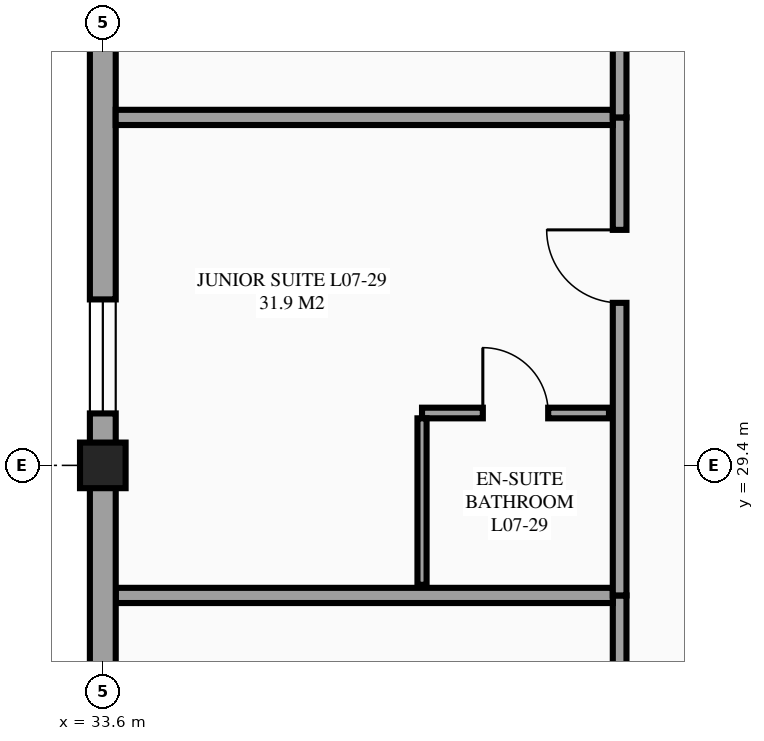
"""IFC4 building model, lengths in metres.
Left out: names, types, materials, properties, quantities, classifications, styles, units other than length and angle.
Written with IfcOpenShell. Run it as: python <this file> out.ifc"""

import sys

from ifc_helpers import new_model, si_unit, direction, frame, frame_2d, origin, origin_2d, place, context, subcontext, project, spatial, rectangle, extrude, element, fill, save


model = new_model("IFC4")
c1 = context("Model", 3, precision=1e-05, world=origin(), true_north=direction((0.0, 1.0)))
c2 = subcontext(c1, "Body", "Model", "MODEL_VIEW")
j1 = project(units=[si_unit("LENGTHUNIT", "METRE"), si_unit("PLANEANGLEUNIT", "RADIAN")], contexts=[c1])
p1 = place(None, origin())
s1 = spatial("IfcSite", under=j1, at=p1, CompositionType="ELEMENT")
p2 = place(p1, origin())
s2 = spatial("IfcBuilding", under=s1, at=p2, CompositionType="ELEMENT")
p3 = place(p2, frame((0.0, 0.0, 29.1)))
s3 = spatial("IfcBuildingStorey", under=s2, at=p3, CompositionType="ELEMENT", Elevation=29.1)
p4 = place(p3, frame((33.6, 29.4, 0.0), z_axis=(0.0, 0.0, 1.0), x_axis=(1.0, 0.0, 0.0)))
e1 = element("IfcColumn", 1, at=p4, inside=s3, PredefinedType="COLUMN", context=c2, shape_type="SweptSolid", body=[
    extrude(rectangle(XDim=0.6, YDim=0.6, at=origin_2d()), origin(), (0.0, 0.0, 1.0), 3.6),
])
p5 = place(p3, frame((33.6, 54.6, 0.0), z_axis=(0.0, 0.0, 1.0), x_axis=(0.0, -1.0, 0.0)))
e2 = element("IfcWall", 2, at=p5, inside=s3, PredefinedType="STANDARD", context=c2, shape_type="SweptSolid", body=[
    extrude(rectangle(XDim=25.2, YDim=0.34, at=frame_2d((12.6, 0.0))), origin(), (0.0, 0.0, 1.0), 2.48),
])
p6 = place(p5, frame((23.017, 0.0, 0.85)))
e3 = element("IfcOpeningElement", 3, at=p6, cuts=e2, PredefinedType="OPENING", context=c2, shape_type="SweptSolid", body=[
    extrude(rectangle(XDim=1.5, YDim=1.5, at=frame_2d((0.75, 0.75))), frame((0.0, 0.18, 0.0), z_axis=(0.0, -1.0, 0.0), x_axis=(1.0, 0.0, 0.0)), (0.0, 0.0, 1.0), 0.36),
])
p7 = place(p5, frame((17.478, 0.0, 0.85)))
e4 = element("IfcOpeningElement", 4, at=p7, cuts=e2, PredefinedType="OPENING", context=c2, shape_type="SweptSolid", body=[
    extrude(rectangle(XDim=1.5, YDim=1.5, at=frame_2d((0.75, 0.75))), frame((0.0, 0.18, 0.0), z_axis=(0.0, -1.0, 0.0), x_axis=(1.0, 0.0, 0.0)), (0.0, 0.0, 1.0), 0.36),
])
p8 = place(p5, frame((10.439, 0.0, 0.85)))
e5 = element("IfcOpeningElement", 5, at=p8, cuts=e2, PredefinedType="OPENING", context=c2, shape_type="SweptSolid", body=[
    extrude(rectangle(XDim=1.5, YDim=1.5, at=frame_2d((0.75, 0.75))), frame((0.0, 0.18, 0.0), z_axis=(0.0, -1.0, 0.0), x_axis=(1.0, 0.0, 0.0)), (0.0, 0.0, 1.0), 0.36),
])
p9 = place(p5, frame((4.15, 0.0, 0.85)))
e6 = element("IfcOpeningElement", 6, at=p9, cuts=e2, PredefinedType="OPENING", context=c2, shape_type="SweptSolid", body=[
    extrude(rectangle(XDim=1.5, YDim=1.5, at=frame_2d((0.75, 0.75))), frame((0.0, 0.18, 0.0), z_axis=(0.0, -1.0, 0.0), x_axis=(1.0, 0.0, 0.0)), (0.0, 0.0, 1.0), 0.36),
])
p10 = place(p3, frame((40.4, 21.4, 0.0), z_axis=(0.0, 0.0, 1.0), x_axis=(0.0, 1.0, 0.0)))
e7 = element("IfcWall", 7, at=p10, inside=s3, PredefinedType="PARTITIONING", context=c2, shape_type="SweptSolid", body=[
    extrude(rectangle(XDim=6.289, YDim=0.18, at=frame_2d((3.145, 0.0))), origin(), (0.0, 0.0, 1.0), 3.375),
])
p11 = place(p10, frame((3.849, 0.0, 0.0)))
e8 = element("IfcOpeningElement", 8, at=p11, cuts=e7, PredefinedType="OPENING", context=c2, shape_type="SweptSolid", body=[
    extrude(rectangle(XDim=0.96, YDim=2.15, at=frame_2d((0.48, 1.075))), frame((0.0, 0.1, 0.0), z_axis=(0.0, -1.0, 0.0), x_axis=(1.0, 0.0, 0.0)), (0.0, 0.0, 1.0), 0.2),
])
p12 = place(p3, frame((33.77, 27.689, 0.0), z_axis=(0.0, 0.0, 1.0), x_axis=(1.0, 0.0, 0.0)))
e9 = element("IfcWall", 9, at=p12, inside=s3, PredefinedType="PARTITIONING", context=c2, shape_type="SweptSolid", body=[
    extrude(rectangle(XDim=6.54, YDim=0.2, at=frame_2d((3.27, 0.0))), origin(), (0.0, 0.0, 1.0), 3.375),
])
p13 = place(p3, frame((40.4, 27.689, 0.0), z_axis=(0.0, 0.0, 1.0), x_axis=(0.0, 1.0, 0.0)))
e10 = element("IfcWall", 10, at=p13, inside=s3, PredefinedType="PARTITIONING", context=c2, shape_type="SweptSolid", body=[
    extrude(rectangle(XDim=6.289, YDim=0.18, at=frame_2d((3.145, 0.0))), origin(), (0.0, 0.0, 1.0), 3.375),
])
p14 = place(p13, frame((3.849, 0.0, 0.0)))
e11 = element("IfcOpeningElement", 11, at=p14, cuts=e10, PredefinedType="OPENING", context=c2, shape_type="SweptSolid", body=[
    extrude(rectangle(XDim=0.96, YDim=2.15, at=frame_2d((0.48, 1.075))), frame((0.0, 0.1, 0.0), z_axis=(0.0, -1.0, 0.0), x_axis=(1.0, 0.0, 0.0)), (0.0, 0.0, 1.0), 0.2),
])
p15 = place(p3, frame((33.77, 33.978, 0.0), z_axis=(0.0, 0.0, 1.0), x_axis=(1.0, 0.0, 0.0)))
e12 = element("IfcWall", 12, at=p15, inside=s3, PredefinedType="PARTITIONING", context=c2, shape_type="SweptSolid", body=[
    extrude(rectangle(XDim=6.54, YDim=0.2, at=frame_2d((3.27, 0.0))), origin(), (0.0, 0.0, 1.0), 3.375),
])
p16 = place(p3, frame((37.8, 30.089, 0.0), z_axis=(0.0, 0.0, 1.0), x_axis=(1.0, 0.0, 0.0)))
e13 = element("IfcWall", 13, at=p16, inside=s3, PredefinedType="PARTITIONING", context=c2, shape_type="SweptSolid", body=[
    extrude(rectangle(XDim=2.46, YDim=0.14, at=frame_2d((1.23, 0.0))), origin(), (0.0, 0.0, 1.0), 3.375),
])
p17 = place(p16, frame((0.8, 0.0, 0.0)))
e14 = element("IfcOpeningElement", 14, at=p17, cuts=e13, PredefinedType="OPENING", context=c2, shape_type="SweptSolid", body=[
    extrude(rectangle(XDim=0.86, YDim=2.1, at=frame_2d((0.43, 1.05))), frame((0.0, 0.08, 0.0), z_axis=(0.0, -1.0, 0.0), x_axis=(1.0, 0.0, 0.0)), (0.0, 0.0, 1.0), 0.16),
])
p18 = place(p3, frame((37.8, 27.829, 0.0), z_axis=(0.0, 0.0, 1.0), x_axis=(0.0, 1.0, 0.0)))
e15 = element("IfcWall", 15, at=p18, inside=s3, PredefinedType="PARTITIONING", context=c2, shape_type="SweptSolid", body=[
    extrude(rectangle(XDim=2.19, YDim=0.12, at=frame_2d((1.095, 0.0))), origin(), (0.0, 0.0, 1.0), 3.375),
])
p19 = place(p3, frame((40.4, 33.978, 0.0), z_axis=(0.0, 0.0, 1.0), x_axis=(0.0, 1.0, 0.0)))
e16 = element("IfcWall", 16, at=p19, inside=s3, PredefinedType="PARTITIONING", context=c2, shape_type="SweptSolid", body=[
    extrude(rectangle(XDim=6.289, YDim=0.18, at=frame_2d((3.145, 0.0))), origin(), (0.0, 0.0, 1.0), 3.375),
])
p20 = place(p19, frame((1.479, 0.0, 0.0)))
e17 = element("IfcOpeningElement", 17, at=p20, cuts=e16, PredefinedType="OPENING", context=c2, shape_type="SweptSolid", body=[
    extrude(rectangle(XDim=0.96, YDim=2.15, at=frame_2d((0.48, 1.075))), frame((0.0, 0.1, 0.0), z_axis=(0.0, -1.0, 0.0), x_axis=(1.0, 0.0, 0.0)), (0.0, 0.0, 1.0), 0.2),
])
p21 = place(p3, frame((33.6, 29.4, 0.0), z_axis=(0.0, 0.0, 1.0), x_axis=(0.0, -1.0, 0.0)))
e18 = element("IfcWall", 18, at=p21, inside=s3, PredefinedType="STANDARD", context=c2, shape_type="SweptSolid", body=[
    extrude(rectangle(XDim=8.4, YDim=0.34, at=frame_2d((4.2, 0.0))), origin(), (0.0, 0.0, 1.0), 2.88),
])
p22 = place(p21, frame((4.106, 0.0, 0.85)))
e19 = element("IfcOpeningElement", 19, at=p22, cuts=e18, PredefinedType="OPENING", context=c2, shape_type="SweptSolid", body=[
    extrude(rectangle(XDim=1.5, YDim=1.5, at=frame_2d((0.75, 0.75))), frame((0.0, 0.18, 0.0), z_axis=(0.0, -1.0, 0.0), x_axis=(1.0, 0.0, 0.0)), (0.0, 0.0, 1.0), 0.36),
])
p23 = place(p6, origin())
e20 = element("IfcWindow", 20, at=p23, inside=s3, PartitioningType="SINGLE_PANEL", PredefinedType="WINDOW", context=c2, shape_type="SweptSolid", body=[
    extrude(rectangle(XDim=1.5, YDim=1.5, at=frame_2d((0.75, 0.75))), frame((0.0, 0.03, 0.0), z_axis=(0.0, -1.0, 0.0), x_axis=(1.0, 0.0, 0.0)), (0.0, 0.0, 1.0), 0.06),
])
fill(e3, e20)
p24 = place(p14, origin())
e21 = element("IfcDoor", 21, at=p24, inside=s3, OperationType="SINGLE_SWING_RIGHT", PredefinedType="DOOR", context=c2, shape_type="SweptSolid", body=[
    extrude(rectangle(XDim=0.96, YDim=2.15, at=frame_2d((0.48, 1.075))), frame((0.0, 0.025, 0.0), z_axis=(0.0, -1.0, 0.0), x_axis=(1.0, 0.0, 0.0)), (0.0, 0.0, 1.0), 0.05),
])
fill(e11, e21)
p25 = place(p17, origin())
e22 = element("IfcDoor", 22, at=p25, inside=s3, OperationType="SINGLE_SWING_LEFT", PredefinedType="DOOR", context=c2, shape_type="SweptSolid", body=[
    extrude(rectangle(XDim=0.86, YDim=2.1, at=frame_2d((0.43, 1.05))), frame((0.0, 0.025, 0.0), z_axis=(0.0, -1.0, 0.0), x_axis=(1.0, 0.0, 0.0)), (0.0, 0.0, 1.0), 0.05),
])
fill(e14, e22)
save(model, sys.argv[1])
